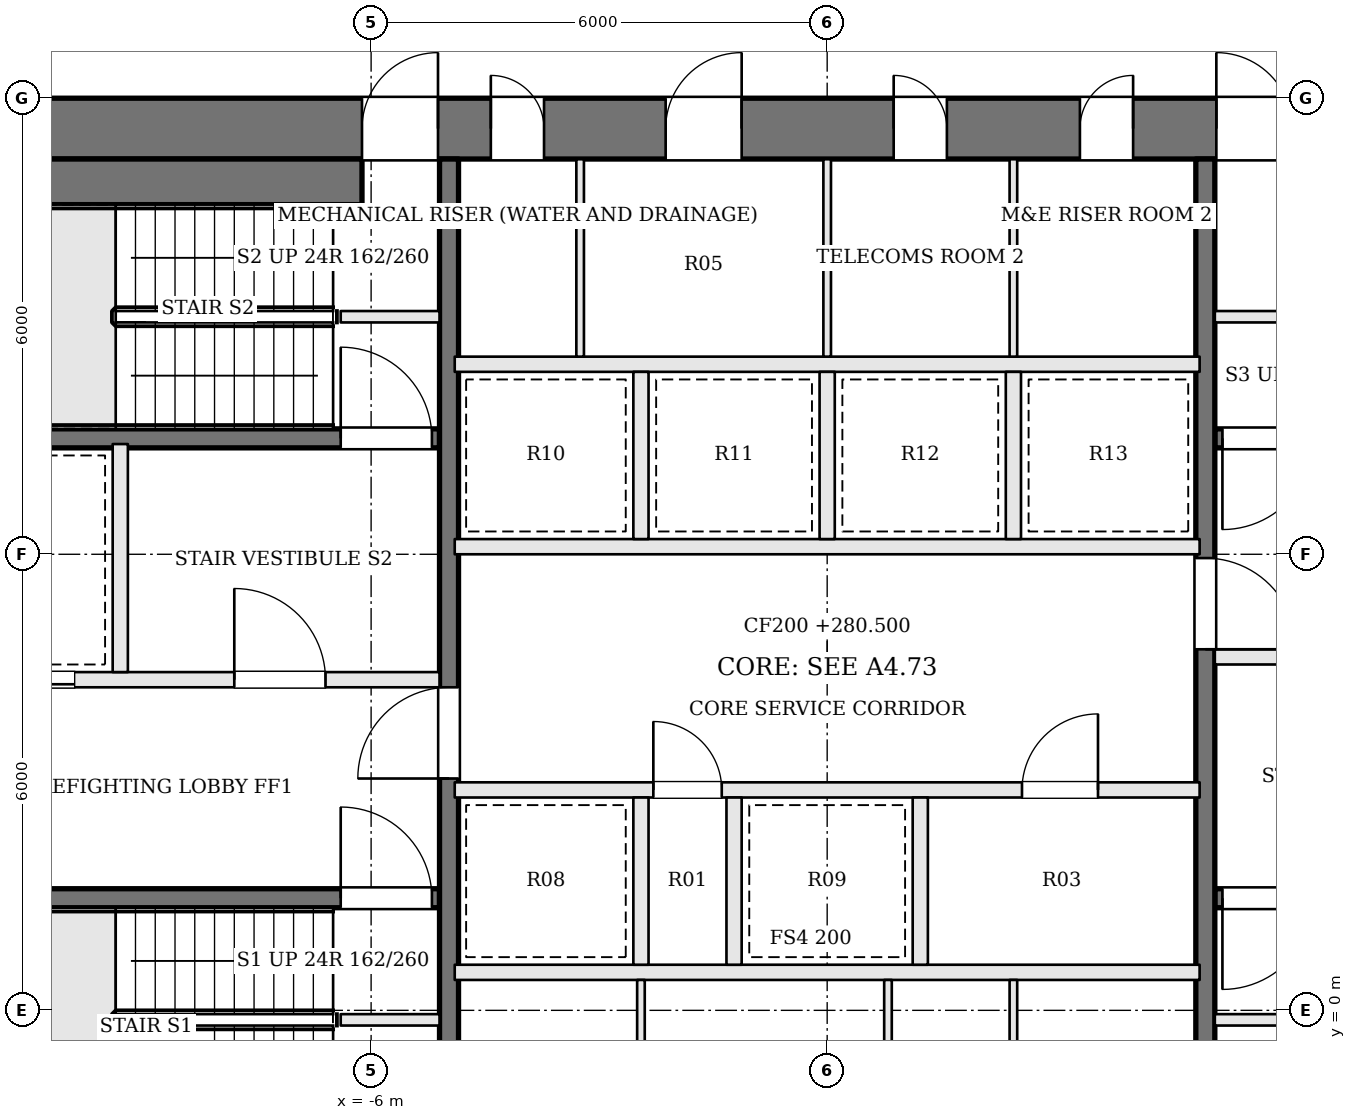
"""IFC4 building model, lengths in metres.
Left out: names, types, materials, properties, quantities, classifications, styles, units other than length and angle.
Written with IfcOpenShell. Run it as: python <this file> out.ifc"""

import sys

from ifc_helpers import new_model, si_unit, direction, frame, frame_2d, origin, place, context, subcontext, project, spatial, rectangle, extrude, element, fill, save


model = new_model("IFC4")
c1 = context("Model", 3, precision=1e-05, world=origin(), true_north=direction((0.0, 1.0)))
c2 = subcontext(c1, "Body", "Model", "MODEL_VIEW")
j1 = project(units=[si_unit("LENGTHUNIT", "METRE"), si_unit("PLANEANGLEUNIT", "RADIAN")], contexts=[c1])
p1 = place(None, origin())
s1 = spatial("IfcSite", under=j1, at=p1, CompositionType="ELEMENT")
p2 = place(p1, origin())
s2 = spatial("IfcBuilding", under=s1, at=p2, CompositionType="ELEMENT")
p3 = place(p2, frame((0.0, 0.0, 280.5)))
s3 = spatial("IfcBuildingStorey", under=s2, at=p3, CompositionType="ELEMENT", Elevation=280.5)
p4 = place(p3, frame((-13.0, 11.6, 0.0), z_axis=(0.0, 0.0, 1.0), x_axis=(1.0, 0.0, 0.0)))
e1 = element("IfcWall", 1, at=p4, inside=s3, PredefinedType="SHEAR", context=c2, shape_type="SweptSolid", body=[
    extrude(rectangle(XDim=26.0, YDim=0.8, at=frame_2d((13.0, 0.0))), origin(), (0.0, 0.0, 1.0), 3.9),
])
p5 = place(p4, frame((8.575, 0.0, 0.0)))
e2 = element("IfcOpeningElement", 2, at=p5, cuts=e1, PredefinedType="OPENING", context=c2, shape_type="SweptSolid", body=[
    extrude(rectangle(XDim=0.7, YDim=2.1, at=frame_2d((0.35, 1.05))), frame((0.0, 0.41, 0.0), z_axis=(0.0, -1.0, 0.0), x_axis=(1.0, 0.0, 0.0)), (0.0, 0.0, 1.0), 0.82),
])
p6 = place(p4, frame((10.875, 0.0, 0.0)))
e3 = element("IfcOpeningElement", 3, at=p6, cuts=e1, PredefinedType="OPENING", context=c2, shape_type="SweptSolid", body=[
    extrude(rectangle(XDim=1.0, YDim=2.1, at=frame_2d((0.5, 1.05))), frame((0.0, 0.41, 0.0), z_axis=(0.0, -1.0, 0.0), x_axis=(1.0, 0.0, 0.0)), (0.0, 0.0, 1.0), 0.82),
])
p7 = place(p4, frame((13.875, 0.0, 0.0)))
e4 = element("IfcOpeningElement", 4, at=p7, cuts=e1, PredefinedType="OPENING", context=c2, shape_type="SweptSolid", body=[
    extrude(rectangle(XDim=0.7, YDim=2.1, at=frame_2d((0.35, 1.05))), frame((0.0, 0.41, 0.0), z_axis=(0.0, -1.0, 0.0), x_axis=(1.0, 0.0, 0.0)), (0.0, 0.0, 1.0), 0.82),
])
p8 = place(p4, frame((16.325, 0.0, 0.0)))
e5 = element("IfcOpeningElement", 5, at=p8, cuts=e1, PredefinedType="OPENING", context=c2, shape_type="SweptSolid", body=[
    extrude(rectangle(XDim=0.7, YDim=2.1, at=frame_2d((0.35, 1.05))), frame((0.0, 0.41, 0.0), z_axis=(0.0, -1.0, 0.0), x_axis=(1.0, 0.0, 0.0)), (0.0, 0.0, 1.0), 0.82),
])
p9 = place(p4, frame((6.88, 0.0, 0.0)))
e6 = element("IfcOpeningElement", 6, at=p9, cuts=e1, PredefinedType="OPENING", context=c2, shape_type="SweptSolid", body=[
    extrude(rectangle(XDim=1.0, YDim=2.1, at=frame_2d((0.5, 1.05))), frame((0.0, 0.41, 0.0), z_axis=(0.0, -1.0, 0.0), x_axis=(1.0, 0.0, 0.0)), (0.0, 0.0, 1.0), 0.82),
])
p10 = place(p4, frame((18.12, 0.0, 0.0)))
e7 = element("IfcOpeningElement", 7, at=p10, cuts=e1, PredefinedType="OPENING", context=c2, shape_type="SweptSolid", body=[
    extrude(rectangle(XDim=1.0, YDim=2.1, at=frame_2d((0.5, 1.05))), frame((0.0, 0.41, 0.0), z_axis=(0.0, -1.0, 0.0), x_axis=(1.0, 0.0, 0.0)), (0.0, 0.0, 1.0), 0.82),
])
for number, where, z_axis, x_axis in (
    (8, (-6.4, -0.125, 0.0), (0.0, 0.0, 1.0), (1.0, 0.0, 0.0)),
    (9, (6.4, 9.125, 0.0), (0.0, 0.0, 1.0), (-1.0, 0.0, 0.0)),
    (10, (-6.4, 9.125, 0.0), (0.0, 0.0, 1.0), (1.0, 0.0, 0.0)),
    (11, (6.4, -0.125, 0.0), (0.0, 0.0, 1.0), (-1.0, 0.0, 0.0)),
):
    element("IfcWall", number, at=place(p3, frame(where, z_axis=z_axis, x_axis=x_axis)), inside=s3, PredefinedType="SOLIDWALL", context=c2, shape_type="SweptSolid", body=[
        extrude(rectangle(XDim=1.3, YDim=0.15, at=frame_2d((0.65, 0.0))), origin(), (0.0, 0.0, 1.0), 3.7),
    ])
p11 = place(p3, frame((-12.2, 1.475, 0.0), z_axis=(0.0, 0.0, 1.0), x_axis=(1.0, 0.0, 0.0)))
e12 = element("IfcWall", 12, at=p11, inside=s3, PredefinedType="SOLIDWALL", context=c2, shape_type="SweptSolid", body=[
    extrude(rectangle(XDim=7.1, YDim=0.25, at=frame_2d((3.55, 0.0))), origin(), (0.0, 0.0, 1.0), 3.7),
])
p12 = place(p11, frame((5.8, 0.0, 0.0)))
e13 = element("IfcOpeningElement", 13, at=p12, cuts=e12, PredefinedType="OPENING", context=c2, shape_type="SweptSolid", body=[
    extrude(rectangle(XDim=1.2, YDim=2.1, at=frame_2d((0.6, 1.05))), frame((0.0, 0.135, 0.0), z_axis=(0.0, -1.0, 0.0), x_axis=(1.0, 0.0, 0.0)), (0.0, 0.0, 1.0), 0.27),
])
p13 = place(p3, frame((12.2, 7.525, 0.0), z_axis=(0.0, 0.0, 1.0), x_axis=(-1.0, 0.0, 0.0)))
e14 = element("IfcWall", 14, at=p13, inside=s3, PredefinedType="SOLIDWALL", context=c2, shape_type="SweptSolid", body=[
    extrude(rectangle(XDim=7.1, YDim=0.25, at=frame_2d((3.55, 0.0))), origin(), (0.0, 0.0, 1.0), 3.7),
])
p14 = place(p13, frame((5.8, 0.0, 0.0)))
e15 = element("IfcOpeningElement", 15, at=p14, cuts=e14, PredefinedType="OPENING", context=c2, shape_type="SweptSolid", body=[
    extrude(rectangle(XDim=1.2, YDim=2.1, at=frame_2d((0.6, 1.05))), frame((0.0, 0.135, 0.0), z_axis=(0.0, -1.0, 0.0), x_axis=(1.0, 0.0, 0.0)), (0.0, 0.0, 1.0), 0.27),
])
p15 = place(p3, frame((-12.2, 4.35, 0.0), z_axis=(0.0, 0.0, 1.0), x_axis=(1.0, 0.0, 0.0)))
e16 = element("IfcWall", 16, at=p15, inside=s3, PredefinedType="SOLIDWALL", context=c2, shape_type="SweptSolid", body=[
    extrude(rectangle(XDim=7.1, YDim=0.2, at=frame_2d((3.55, 0.0))), origin(), (0.0, 0.0, 1.0), 3.7),
])
p16 = place(p15, frame((4.4, 0.0, 0.0)))
e17 = element("IfcOpeningElement", 17, at=p16, cuts=e16, PredefinedType="OPENING", context=c2, shape_type="SweptSolid", body=[
    extrude(rectangle(XDim=1.2, YDim=2.1, at=frame_2d((0.6, 1.05))), frame((0.0, 0.11, 0.0), z_axis=(0.0, -1.0, 0.0), x_axis=(1.0, 0.0, 0.0)), (0.0, 0.0, 1.0), 0.22),
])
p17 = place(p15, frame((1.1, 0.0, 0.0)))
e18 = element("IfcOpeningElement", 18, at=p17, cuts=e16, PredefinedType="OPENING", context=c2, shape_type="SweptSolid", body=[
    extrude(rectangle(XDim=1.2, YDim=2.1, at=frame_2d((0.6, 1.05))), frame((0.0, 0.11, 0.0), z_axis=(0.0, -1.0, 0.0), x_axis=(1.0, 0.0, 0.0)), (0.0, 0.0, 1.0), 0.22),
])
p18 = place(p3, frame((12.2, 4.65, 0.0), z_axis=(0.0, 0.0, 1.0), x_axis=(-1.0, 0.0, 0.0)))
e19 = element("IfcWall", 19, at=p18, inside=s3, PredefinedType="SOLIDWALL", context=c2, shape_type="SweptSolid", body=[
    extrude(rectangle(XDim=7.1, YDim=0.2, at=frame_2d((3.55, 0.0))), origin(), (0.0, 0.0, 1.0), 3.7),
])
p19 = place(p18, frame((4.4, 0.0, 0.0)))
e20 = element("IfcOpeningElement", 20, at=p19, cuts=e19, PredefinedType="OPENING", context=c2, shape_type="SweptSolid", body=[
    extrude(rectangle(XDim=1.2, YDim=2.1, at=frame_2d((0.6, 1.05))), frame((0.0, 0.11, 0.0), z_axis=(0.0, -1.0, 0.0), x_axis=(1.0, 0.0, 0.0)), (0.0, 0.0, 1.0), 0.22),
])
p20 = place(p18, frame((1.1, 0.0, 0.0)))
e21 = element("IfcOpeningElement", 21, at=p20, cuts=e19, PredefinedType="OPENING", context=c2, shape_type="SweptSolid", body=[
    extrude(rectangle(XDim=1.2, YDim=2.1, at=frame_2d((0.6, 1.05))), frame((0.0, 0.11, 0.0), z_axis=(0.0, -1.0, 0.0), x_axis=(1.0, 0.0, 0.0)), (0.0, 0.0, 1.0), 0.22),
])
p21 = place(p3, frame((-12.2, 7.525, 0.0), z_axis=(0.0, 0.0, 1.0), x_axis=(1.0, 0.0, 0.0)))
e22 = element("IfcWall", 22, at=p21, inside=s3, PredefinedType="SOLIDWALL", context=c2, shape_type="SweptSolid", body=[
    extrude(rectangle(XDim=7.1, YDim=0.25, at=frame_2d((3.55, 0.0))), origin(), (0.0, 0.0, 1.0), 3.7),
])
p22 = place(p21, frame((5.8, 0.0, 0.0)))
e23 = element("IfcOpeningElement", 23, at=p22, cuts=e22, PredefinedType="OPENING", context=c2, shape_type="SweptSolid", body=[
    extrude(rectangle(XDim=1.2, YDim=2.1, at=frame_2d((0.6, 1.05))), frame((0.0, 0.135, 0.0), z_axis=(0.0, -1.0, 0.0), x_axis=(1.0, 0.0, 0.0)), (0.0, 0.0, 1.0), 0.27),
])
p23 = place(p3, frame((12.2, 1.475, 0.0), z_axis=(0.0, 0.0, 1.0), x_axis=(-1.0, 0.0, 0.0)))
e24 = element("IfcWall", 24, at=p23, inside=s3, PredefinedType="SOLIDWALL", context=c2, shape_type="SweptSolid", body=[
    extrude(rectangle(XDim=7.1, YDim=0.25, at=frame_2d((3.55, 0.0))), origin(), (0.0, 0.0, 1.0), 3.7),
])
p24 = place(p23, frame((5.8, 0.0, 0.0)))
e25 = element("IfcOpeningElement", 25, at=p24, cuts=e24, PredefinedType="OPENING", context=c2, shape_type="SweptSolid", body=[
    extrude(rectangle(XDim=1.2, YDim=2.1, at=frame_2d((0.6, 1.05))), frame((0.0, 0.135, 0.0), z_axis=(0.0, -1.0, 0.0), x_axis=(1.0, 0.0, 0.0)), (0.0, 0.0, 1.0), 0.27),
])
p25 = place(p3, frame((-9.3, 4.45, 0.0), z_axis=(0.0, 0.0, 1.0), x_axis=(0.0, 1.0, 0.0)))
e26 = element("IfcWall", 26, at=p25, inside=s3, PredefinedType="SOLIDWALL", context=c2, shape_type="SweptSolid", body=[
    extrude(rectangle(XDim=3.0, YDim=0.2, at=frame_2d((1.5, 0.0))), origin(), (0.0, 0.0, 1.0), 3.7),
])
p26 = place(p3, frame((-4.975, -2.2, 0.0), z_axis=(0.0, 0.0, 1.0), x_axis=(0.0, 1.0, 0.0)))
e27 = element("IfcWall", 27, at=p26, inside=s3, PredefinedType="SOLIDWALL", context=c2, shape_type="SweptSolid", body=[
    extrude(rectangle(XDim=13.4, YDim=0.25, at=frame_2d((6.7, 0.0))), origin(), (0.0, 0.0, 1.0), 3.7),
])
p27 = place(p26, frame((5.25, 0.0, 0.0)))
e28 = element("IfcOpeningElement", 28, at=p27, cuts=e27, PredefinedType="OPENING", context=c2, shape_type="SweptSolid", body=[
    extrude(rectangle(XDim=1.2, YDim=2.1, at=frame_2d((0.6, 1.05))), frame((0.0, 0.135, 0.0), z_axis=(0.0, -1.0, 0.0), x_axis=(1.0, 0.0, 0.0)), (0.0, 0.0, 1.0), 0.27),
])
p28 = place(p3, frame((4.975, 11.2, 0.0), z_axis=(0.0, 0.0, 1.0), x_axis=(0.0, -1.0, 0.0)))
e29 = element("IfcWall", 29, at=p28, inside=s3, PredefinedType="SOLIDWALL", context=c2, shape_type="SweptSolid", body=[
    extrude(rectangle(XDim=13.4, YDim=0.25, at=frame_2d((6.7, 0.0))), origin(), (0.0, 0.0, 1.0), 3.7),
])
p29 = place(p28, frame((5.25, 0.0, 0.0)))
e30 = element("IfcOpeningElement", 30, at=p29, cuts=e29, PredefinedType="OPENING", context=c2, shape_type="SweptSolid", body=[
    extrude(rectangle(XDim=1.2, YDim=2.1, at=frame_2d((0.6, 1.05))), frame((0.0, 0.135, 0.0), z_axis=(0.0, -1.0, 0.0), x_axis=(1.0, 0.0, 0.0)), (0.0, 0.0, 1.0), 0.27),
])
p30 = place(p3, frame((-12.2, 10.9, 0.0), z_axis=(0.0, 0.0, 1.0), x_axis=(1.0, 0.0, 0.0)))
e31 = element("IfcWall", 31, at=p30, inside=s3, PredefinedType="SOLIDWALL", context=c2, shape_type="SweptSolid", body=[
    extrude(rectangle(XDim=6.08, YDim=0.6, at=frame_2d((3.04, 0.0))), origin(), (0.0, 0.0, 1.0), 3.7),
])
p31 = place(p3, frame((-4.9, 0.5, 0.0), z_axis=(0.0, 0.0, 1.0), x_axis=(1.0, 0.0, 0.0)))
e32 = element("IfcWall", 32, at=p31, inside=s3, PredefinedType="SOLIDWALL", context=c2, shape_type="SweptSolid", body=[
    extrude(rectangle(XDim=9.8, YDim=0.2, at=frame_2d((4.9, 0.0))), origin(), (0.0, 0.0, 1.0), 3.7),
])
p32 = place(p3, frame((-4.9, 2.9, 0.0), z_axis=(0.0, 0.0, 1.0), x_axis=(1.0, 0.0, 0.0)))
e33 = element("IfcWall", 33, at=p32, inside=s3, PredefinedType="SOLIDWALL", context=c2, shape_type="SweptSolid", body=[
    extrude(rectangle(XDim=9.8, YDim=0.2, at=frame_2d((4.9, 0.0))), origin(), (0.0, 0.0, 1.0), 3.7),
])
p33 = place(p32, frame((2.613, 0.0, 0.0)))
e34 = element("IfcOpeningElement", 34, at=p33, cuts=e33, PredefinedType="OPENING", context=c2, shape_type="SweptSolid", body=[
    extrude(rectangle(XDim=0.9, YDim=2.1, at=frame_2d((0.45, 1.05))), frame((0.0, 0.11, 0.0), z_axis=(0.0, -1.0, 0.0), x_axis=(1.0, 0.0, 0.0)), (0.0, 0.0, 1.0), 0.22),
])
p34 = place(p32, frame((7.463, 0.0, 0.0)))
e35 = element("IfcOpeningElement", 35, at=p34, cuts=e33, PredefinedType="OPENING", context=c2, shape_type="SweptSolid", body=[
    extrude(rectangle(XDim=1.0, YDim=2.1, at=frame_2d((0.5, 1.05))), frame((0.0, 0.11, 0.0), z_axis=(0.0, -1.0, 0.0), x_axis=(1.0, 0.0, 0.0)), (0.0, 0.0, 1.0), 0.22),
])
for number, where, z_axis, x_axis in (
    (36, (-4.9, 6.1, 0.0), (0.0, 0.0, 1.0), (1.0, 0.0, 0.0)),
    (37, (-4.9, 8.5, 0.0), (0.0, 0.0, 1.0), (1.0, 0.0, 0.0)),
):
    element("IfcWall", number, at=place(p3, frame(where, z_axis=z_axis, x_axis=x_axis)), inside=s3, PredefinedType="SOLIDWALL", context=c2, shape_type="SweptSolid", body=[
        extrude(rectangle(XDim=9.8, YDim=0.2, at=frame_2d((4.9, 0.0))), origin(), (0.0, 0.0, 1.0), 3.7),
    ])
for number, where, z_axis, x_axis in (
    (38, (-2.45, 0.6, 0.0), (0.0, 0.0, 1.0), (0.0, 1.0, 0.0)),
    (39, (-1.225, 0.6, 0.0), (0.0, 0.0, 1.0), (0.0, 1.0, 0.0)),
    (40, (1.225, 0.6, 0.0), (0.0, 0.0, 1.0), (0.0, 1.0, 0.0)),
    (41, (-2.45, 6.2, 0.0), (0.0, 0.0, 1.0), (0.0, 1.0, 0.0)),
    (42, (0.0, 6.2, 0.0), (0.0, 0.0, 1.0), (0.0, 1.0, 0.0)),
    (43, (2.45, 6.2, 0.0), (0.0, 0.0, 1.0), (0.0, 1.0, 0.0)),
):
    element("IfcWall", number, at=place(p3, frame(where, z_axis=z_axis, x_axis=x_axis)), inside=s3, PredefinedType="SOLIDWALL", context=c2, shape_type="SweptSolid", body=[
        extrude(rectangle(XDim=2.2, YDim=0.2, at=frame_2d((1.1, 0.0))), origin(), (0.0, 0.0, 1.0), 3.7),
    ])
for number, where, z_axis, x_axis in (
    (44, (-2.45, -2.2, 0.0), (0.0, 0.0, 1.0), (0.0, 1.0, 0.0)),
    (45, (0.8, -2.2, 0.0), (0.0, 0.0, 1.0), (0.0, 1.0, 0.0)),
    (46, (2.45, -2.2, 0.0), (0.0, 0.0, 1.0), (0.0, 1.0, 0.0)),
    (47, (-3.25, 8.6, 0.0), (0.0, 0.0, 1.0), (0.0, 1.0, 0.0)),
    (48, (0.0, 8.6, 0.0), (0.0, 0.0, 1.0), (0.0, 1.0, 0.0)),
    (49, (2.45, 8.6, 0.0), (0.0, 0.0, 1.0), (0.0, 1.0, 0.0)),
):
    element("IfcWall", number, at=place(p3, frame(where, z_axis=z_axis, x_axis=x_axis)), inside=s3, PredefinedType="PARTITIONING", context=c2, shape_type="SweptSolid", body=[
        extrude(rectangle(XDim=2.6, YDim=0.1, at=frame_2d((1.3, 0.0))), origin(), (0.0, 0.0, 1.0), 3.7),
    ])
p35 = place(p27, origin())
e50 = element("IfcDoor", 50, at=p35, inside=s3, OperationType="SINGLE_SWING_LEFT", PredefinedType="DOOR", context=c2, shape_type="SweptSolid", body=[
    extrude(rectangle(XDim=1.2, YDim=2.1, at=frame_2d((0.6, 1.05))), frame((0.0, 0.025, 0.0), z_axis=(0.0, -1.0, 0.0), x_axis=(1.0, 0.0, 0.0)), (0.0, 0.0, 1.0), 0.05),
])
fill(e28, e50)
p36 = place(p29, origin())
e51 = element("IfcDoor", 51, at=p36, inside=s3, OperationType="SINGLE_SWING_RIGHT", PredefinedType="DOOR", context=c2, shape_type="SweptSolid", body=[
    extrude(rectangle(XDim=1.2, YDim=2.1, at=frame_2d((0.6, 1.05))), frame((0.0, 0.025, 0.0), z_axis=(0.0, -1.0, 0.0), x_axis=(1.0, 0.0, 0.0)), (0.0, 0.0, 1.0), 0.05),
])
fill(e30, e51)
p37 = place(p16, origin())
e52 = element("IfcDoor", 52, at=p37, inside=s3, OperationType="SINGLE_SWING_LEFT", PredefinedType="DOOR", context=c2, shape_type="SweptSolid", body=[
    extrude(rectangle(XDim=1.2, YDim=2.1, at=frame_2d((0.6, 1.05))), frame((0.0, 0.025, 0.0), z_axis=(0.0, -1.0, 0.0), x_axis=(1.0, 0.0, 0.0)), (0.0, 0.0, 1.0), 0.05),
])
fill(e17, e52)
p38 = place(p12, origin())
e53 = element("IfcDoor", 53, at=p38, inside=s3, OperationType="SINGLE_SWING_LEFT", PredefinedType="DOOR", context=c2, shape_type="SweptSolid", body=[
    extrude(rectangle(XDim=1.2, YDim=2.1, at=frame_2d((0.6, 1.05))), frame((0.0, 0.025, 0.0), z_axis=(0.0, -1.0, 0.0), x_axis=(1.0, 0.0, 0.0)), (0.0, 0.0, 1.0), 0.05),
])
fill(e13, e53)
p39 = place(p14, origin())
e54 = element("IfcDoor", 54, at=p39, inside=s3, OperationType="SINGLE_SWING_RIGHT", PredefinedType="DOOR", context=c2, shape_type="SweptSolid", body=[
    extrude(rectangle(XDim=1.2, YDim=2.1, at=frame_2d((0.6, 1.05))), frame((0.0, 0.025, 0.0), z_axis=(0.0, -1.0, 0.0), x_axis=(1.0, 0.0, 0.0)), (0.0, 0.0, 1.0), 0.05),
])
fill(e15, e54)
p40 = place(p22, origin())
e55 = element("IfcDoor", 55, at=p40, inside=s3, OperationType="SINGLE_SWING_LEFT", PredefinedType="DOOR", context=c2, shape_type="SweptSolid", body=[
    extrude(rectangle(XDim=1.2, YDim=2.1, at=frame_2d((0.6, 1.05))), frame((0.0, 0.025, 0.0), z_axis=(0.0, -1.0, 0.0), x_axis=(1.0, 0.0, 0.0)), (0.0, 0.0, 1.0), 0.05),
])
fill(e23, e55)
p41 = place(p24, origin())
e56 = element("IfcDoor", 56, at=p41, inside=s3, OperationType="SINGLE_SWING_RIGHT", PredefinedType="DOOR", context=c2, shape_type="SweptSolid", body=[
    extrude(rectangle(XDim=1.2, YDim=2.1, at=frame_2d((0.6, 1.05))), frame((0.0, 0.025, 0.0), z_axis=(0.0, -1.0, 0.0), x_axis=(1.0, 0.0, 0.0)), (0.0, 0.0, 1.0), 0.05),
])
fill(e25, e56)
p42 = place(p17, origin())
e57 = element("IfcDoor", 57, at=p42, inside=s3, OperationType="SLIDING_TO_RIGHT", PredefinedType="DOOR", context=c2, shape_type="SweptSolid", body=[
    extrude(rectangle(XDim=1.2, YDim=2.1, at=frame_2d((0.6, 1.05))), frame((0.0, 0.025, 0.0), z_axis=(0.0, -1.0, 0.0), x_axis=(1.0, 0.0, 0.0)), (0.0, 0.0, 1.0), 0.05),
])
fill(e18, e57)
p43 = place(p33, origin())
e58 = element("IfcDoor", 58, at=p43, inside=s3, OperationType="SINGLE_SWING_LEFT", PredefinedType="DOOR", context=c2, shape_type="SweptSolid", body=[
    extrude(rectangle(XDim=0.9, YDim=2.1, at=frame_2d((0.45, 1.05))), frame((0.0, 0.025, 0.0), z_axis=(0.0, -1.0, 0.0), x_axis=(1.0, 0.0, 0.0)), (0.0, 0.0, 1.0), 0.05),
])
fill(e34, e58)
p44 = place(p34, origin())
e59 = element("IfcDoor", 59, at=p44, inside=s3, OperationType="SINGLE_SWING_RIGHT", PredefinedType="DOOR", context=c2, shape_type="SweptSolid", body=[
    extrude(rectangle(XDim=1.0, YDim=2.1, at=frame_2d((0.5, 1.05))), frame((0.0, 0.025, 0.0), z_axis=(0.0, -1.0, 0.0), x_axis=(1.0, 0.0, 0.0)), (0.0, 0.0, 1.0), 0.05),
])
fill(e35, e59)
p45 = place(p5, origin())
e60 = element("IfcDoor", 60, at=p45, inside=s3, OperationType="SINGLE_SWING_LEFT", PredefinedType="DOOR", context=c2, shape_type="SweptSolid", body=[
    extrude(rectangle(XDim=0.7, YDim=2.1, at=frame_2d((0.35, 1.05))), frame((0.0, 0.025, 0.0), z_axis=(0.0, -1.0, 0.0), x_axis=(1.0, 0.0, 0.0)), (0.0, 0.0, 1.0), 0.05),
])
fill(e2, e60)
p46 = place(p6, origin())
e61 = element("IfcDoor", 61, at=p46, inside=s3, OperationType="SINGLE_SWING_RIGHT", PredefinedType="DOOR", context=c2, shape_type="SweptSolid", body=[
    extrude(rectangle(XDim=1.0, YDim=2.1, at=frame_2d((0.5, 1.05))), frame((0.0, 0.025, 0.0), z_axis=(0.0, -1.0, 0.0), x_axis=(1.0, 0.0, 0.0)), (0.0, 0.0, 1.0), 0.05),
])
fill(e3, e61)
p47 = place(p7, origin())
e62 = element("IfcDoor", 62, at=p47, inside=s3, OperationType="SINGLE_SWING_LEFT", PredefinedType="DOOR", context=c2, shape_type="SweptSolid", body=[
    extrude(rectangle(XDim=0.7, YDim=2.1, at=frame_2d((0.35, 1.05))), frame((0.0, 0.025, 0.0), z_axis=(0.0, -1.0, 0.0), x_axis=(1.0, 0.0, 0.0)), (0.0, 0.0, 1.0), 0.05),
])
fill(e4, e62)
p48 = place(p8, origin())
e63 = element("IfcDoor", 63, at=p48, inside=s3, OperationType="SINGLE_SWING_RIGHT", PredefinedType="DOOR", context=c2, shape_type="SweptSolid", body=[
    extrude(rectangle(XDim=0.7, YDim=2.1, at=frame_2d((0.35, 1.05))), frame((0.0, 0.025, 0.0), z_axis=(0.0, -1.0, 0.0), x_axis=(1.0, 0.0, 0.0)), (0.0, 0.0, 1.0), 0.05),
])
fill(e5, e63)
p49 = place(p9, origin())
e64 = element("IfcDoor", 64, at=p49, inside=s3, OperationType="SINGLE_SWING_RIGHT", PredefinedType="DOOR", context=c2, shape_type="SweptSolid", body=[
    extrude(rectangle(XDim=1.0, YDim=2.1, at=frame_2d((0.5, 1.05))), frame((0.0, 0.025, 0.0), z_axis=(0.0, -1.0, 0.0), x_axis=(1.0, 0.0, 0.0)), (0.0, 0.0, 1.0), 0.05),
])
fill(e6, e64)
p50 = place(p10, origin())
e65 = element("IfcDoor", 65, at=p50, inside=s3, OperationType="SINGLE_SWING_LEFT", PredefinedType="DOOR", context=c2, shape_type="SweptSolid", body=[
    extrude(rectangle(XDim=1.0, YDim=2.1, at=frame_2d((0.5, 1.05))), frame((0.0, 0.025, 0.0), z_axis=(0.0, -1.0, 0.0), x_axis=(1.0, 0.0, 0.0)), (0.0, 0.0, 1.0), 0.05),
])
fill(e7, e65)
save(model, sys.argv[1])
